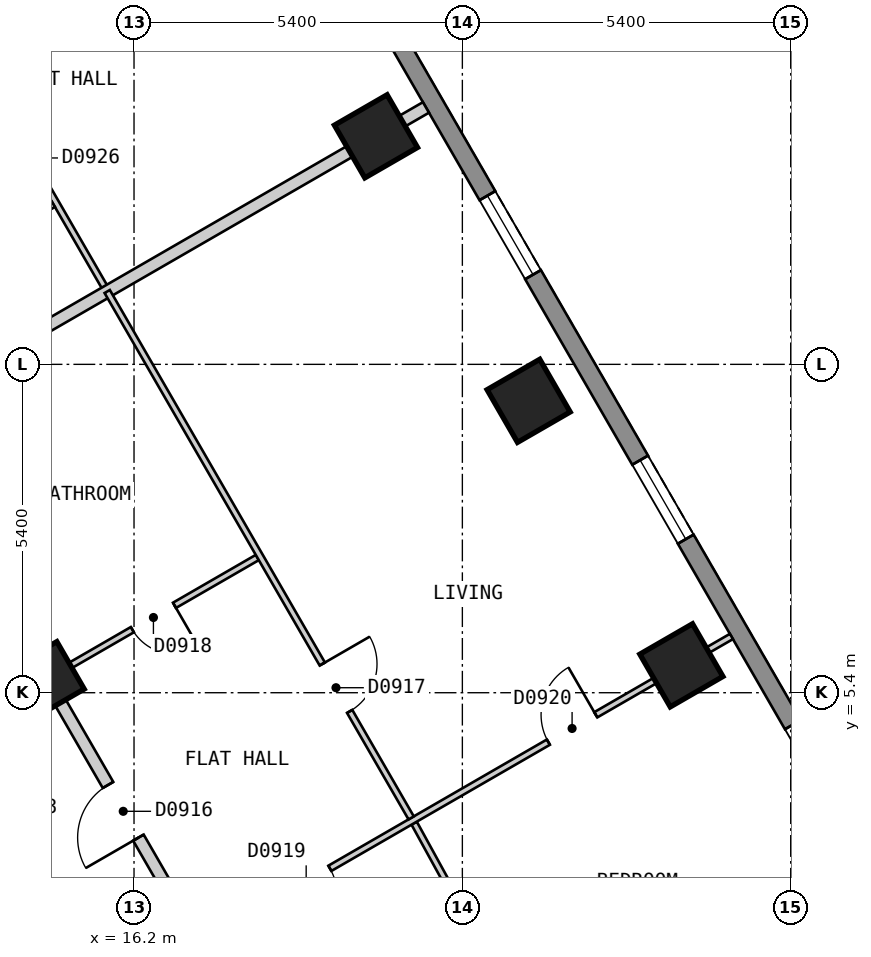
"""IFC4 building model, lengths in metres.
Left out: names, types, materials, properties, quantities, classifications, styles, units other than length and angle.
Written with IfcOpenShell. Run it as: python <this file> out.ifc"""

import sys

from ifc_helpers import new_model, si_unit, direction, frame, frame_2d, origin, origin_2d, place, context, subcontext, project, spatial, polyline, rectangle, outline, extrude, element, fill, save


model = new_model("IFC4")
c1 = context("Model", 3, precision=1e-05, world=origin(), true_north=direction((0.0, 1.0)))
c2 = subcontext(c1, "Body", "Model", "MODEL_VIEW")
j1 = project(units=[si_unit("LENGTHUNIT", "METRE"), si_unit("PLANEANGLEUNIT", "RADIAN")], contexts=[c1])
p1 = place(None, origin())
s1 = spatial("IfcSite", under=j1, at=p1, CompositionType="ELEMENT")
p2 = place(p1, origin())
s2 = spatial("IfcBuilding", under=s1, at=p2, CompositionType="ELEMENT")
p3 = place(p2, frame((0.0, 0.0, 102.0)))
s3 = spatial("IfcBuildingStorey", under=s2, at=p3, CompositionType="ELEMENT", Elevation=102.0)
for number, where, z_axis, x_axis in (
    (1, (25.202, 5.85, 0.0), (0.0, 0.0, 1.0), (-0.5, 0.866, 0.0)),
    (2, (22.69, 10.2, 0.0), (0.0, 0.0, 1.0), (-0.5, 0.866, 0.0)),
    (3, (20.179, 14.55, 0.0), (0.0, 0.0, 1.0), (-0.5, 0.866, 0.0)),
):
    element("IfcColumn", number, at=place(p3, frame(where, z_axis=z_axis, x_axis=x_axis)), inside=s3, PredefinedType="COLUMN", context=c2, shape_type="SweptSolid", body=[
        extrude(rectangle(XDim=1.0, YDim=1.0, at=origin_2d()), origin(), (0.0, 0.0, 1.0), 3.0),
    ])
p4 = place(p3, frame((14.766, 5.625, 0.0), z_axis=(0.0, 0.0, 1.0), x_axis=(-0.5, 0.866025403784, 0.0)))
e4 = element("IfcColumn", 4, at=p4, inside=s3, PredefinedType="COLUMN", context=c2, shape_type="SweptSolid", body=[
    extrude(rectangle(XDim=0.9, YDim=0.9, at=origin_2d()), origin(), (0.0, 0.0, 1.0), 3.0),
])
p5 = place(p3, frame((29.027, 1.425, 0.0), z_axis=(0.0, 0.0, 1.0), x_axis=(-0.500027479704, 0.866009537788, 0.0)))
e5 = element("IfcWall", 5, at=p5, inside=s3, PredefinedType="SOLIDWALL", context=c2, shape_type="SweptSolid", body=[
    extrude(outline(polyline([(0.0, -0.15), (26.559, -0.15), (26.478, 0.15), (0.08, 0.15), (0.0, -0.15)])), origin(), (0.0, 0.0, 1.0), 2.7),
])
p6 = place(p5, frame((2.483, 0.0, 0.15)))
e6 = element("IfcOpeningElement", 6, at=p6, cuts=e5, PredefinedType="OPENING", context=c2, shape_type="SweptSolid", body=[
    extrude(rectangle(XDim=1.5, YDim=2.1, at=frame_2d((0.75, 1.05))), frame((0.0, 0.16, 0.0), z_axis=(0.0, -1.0, 0.0), x_axis=(1.0, 0.0, 0.0)), (0.0, 0.0, 1.0), 0.32),
])
p7 = place(p5, frame((7.506, 0.0, 0.15)))
e7 = element("IfcOpeningElement", 7, at=p7, cuts=e5, PredefinedType="OPENING", context=c2, shape_type="SweptSolid", body=[
    extrude(rectangle(XDim=1.5, YDim=2.1, at=frame_2d((0.75, 1.05))), frame((0.0, 0.16, 0.0), z_axis=(0.0, -1.0, 0.0), x_axis=(1.0, 0.0, 0.0)), (0.0, 0.0, 1.0), 0.32),
])
p8 = place(p5, frame((12.529, 0.0, 0.15)))
e8 = element("IfcOpeningElement", 8, at=p8, cuts=e5, PredefinedType="OPENING", context=c2, shape_type="SweptSolid", body=[
    extrude(rectangle(XDim=1.5, YDim=2.1, at=frame_2d((0.75, 1.05))), frame((0.0, 0.16, 0.0), z_axis=(0.0, -1.0, 0.0), x_axis=(1.0, 0.0, 0.0)), (0.0, 0.0, 1.0), 0.32),
])
p9 = place(p5, frame((17.552, 0.0, 0.15)))
e9 = element("IfcOpeningElement", 9, at=p9, cuts=e5, PredefinedType="OPENING", context=c2, shape_type="SweptSolid", body=[
    extrude(rectangle(XDim=1.5, YDim=2.1, at=frame_2d((0.75, 1.05))), frame((0.0, 0.16, 0.0), z_axis=(0.0, -1.0, 0.0), x_axis=(1.0, 0.0, 0.0)), (0.0, 0.0, 1.0), 0.32),
])
p10 = place(p5, frame((22.575, 0.0, 0.15)))
e10 = element("IfcOpeningElement", 10, at=p10, cuts=e5, PredefinedType="OPENING", context=c2, shape_type="SweptSolid", body=[
    extrude(rectangle(XDim=1.5, YDim=2.1, at=frame_2d((0.75, 1.05))), frame((0.0, 0.16, 0.0), z_axis=(0.0, -1.0, 0.0), x_axis=(1.0, 0.0, 0.0)), (0.0, 0.0, 1.0), 0.32),
])
p11 = place(p3, frame((10.913, 7.899, 0.0), z_axis=(0.0, 0.0, 1.0), x_axis=(0.500028940566, -0.866008694296, 0.0)))
e11 = element("IfcWall", 11, at=p11, inside=s3, PredefinedType="PARTITIONING", context=c2, shape_type="SweptSolid", body=[
    extrude(rectangle(XDim=10.159, YDim=0.2, at=frame_2d((5.08, 0.0))), origin(), (0.0, 0.0, 1.0), 2.7),
])
p12 = place(p11, frame((4.63, 0.0, 0.0)))
e12 = element("IfcOpeningElement", 12, at=p12, cuts=e11, PredefinedType="OPENING", context=c2, shape_type="SweptSolid", body=[
    extrude(rectangle(XDim=0.9, YDim=2.1, at=frame_2d((0.45, 1.05))), frame((0.0, 0.11, 0.0), z_axis=(0.0, -1.0, 0.0), x_axis=(1.0, 0.0, 0.0)), (0.0, 0.0, 1.0), 0.22),
])
p13 = place(p3, frame((8.488, 16.5, 0.0), z_axis=(0.0, 0.0, 1.0), x_axis=(0.499986836607, -0.86603300354, 0.0)))
e13 = element("IfcWall", 13, at=p13, inside=s3, PredefinedType="PARTITIONING", context=c2, shape_type="SweptSolid", body=[
    extrude(rectangle(XDim=20.09, YDim=0.2, at=frame_2d((10.045, 0.0))), origin(), (0.0, 0.0, 1.0), 2.7),
])
p14 = place(p13, frame((14.569, 0.0, 0.0)))
e14 = element("IfcOpeningElement", 14, at=p14, cuts=e13, PredefinedType="OPENING", context=c2, shape_type="SweptSolid", body=[
    extrude(rectangle(XDim=1.0, YDim=2.1, at=frame_2d((0.5, 1.05))), frame((0.0, 0.11, 0.0), z_axis=(0.0, -1.0, 0.0), x_axis=(1.0, 0.0, 0.0)), (0.0, 0.0, 1.0), 0.22),
])
p15 = place(p13, frame((4.547, 0.0, 0.0)))
e15 = element("IfcOpeningElement", 15, at=p15, cuts=e13, PredefinedType="OPENING", context=c2, shape_type="SweptSolid", body=[
    extrude(rectangle(XDim=1.0, YDim=2.1, at=frame_2d((0.5, 1.05))), frame((0.0, 0.11, 0.0), z_axis=(0.0, -1.0, 0.0), x_axis=(1.0, 0.0, 0.0)), (0.0, 0.0, 1.0), 0.22),
])
p16 = place(p3, frame((13.263, 16.322, 0.0), z_axis=(0.0, 0.0, 1.0), x_axis=(0.499946798379, -0.866056117576, 0.0)))
e16 = element("IfcWall", 16, at=p16, inside=s3, PredefinedType="PARTITIONING", context=c2, shape_type="SweptSolid", body=[
    extrude(rectangle(XDim=4.993, YDim=0.1, at=frame_2d((2.496, 0.0))), origin(), (0.0, 0.0, 1.0), 2.7),
])
p17 = place(p16, frame((2.007, 0.0, 0.0)))
e17 = element("IfcOpeningElement", 17, at=p17, cuts=e16, PredefinedType="OPENING", context=c2, shape_type="SweptSolid", body=[
    extrude(rectangle(XDim=0.9, YDim=2.1, at=frame_2d((0.45, 1.05))), frame((0.0, 0.06, 0.0), z_axis=(0.0, -1.0, 0.0), x_axis=(1.0, 0.0, 0.0)), (0.0, 0.0, 1.0), 0.12),
])
p18 = place(p3, frame((20.807, 3.255, 0.0), z_axis=(0.0, 0.0, 1.0), x_axis=(0.481604009855, -0.876388942018, 0.0)))
e18 = element("IfcWall", 18, at=p18, inside=s3, PredefinedType="PARTITIONING", context=c2, shape_type="SweptSolid", body=[
    extrude(rectangle(XDim=4.795, YDim=0.1, at=frame_2d((2.397, 0.0))), origin(), (0.0, 0.0, 1.0), 2.7),
])
p19 = place(p3, frame((17.365, 1.325, 0.0), z_axis=(0.0, 0.0, 1.0), x_axis=(0.866016855193, 0.500014806302, 0.0)))
e19 = element("IfcWall", 19, at=p19, inside=s3, PredefinedType="PARTITIONING", context=c2, shape_type="SweptSolid", body=[
    extrude(rectangle(XDim=10.0, YDim=0.1, at=frame_2d((5.0, 0.0))), origin(), (0.0, 0.0, 1.0), 2.7),
])
p20 = place(p19, frame((1.474, 0.0, 0.0)))
e20 = element("IfcOpeningElement", 20, at=p20, cuts=e19, PredefinedType="OPENING", context=c2, shape_type="SweptSolid", body=[
    extrude(rectangle(XDim=0.9, YDim=2.1, at=frame_2d((0.45, 1.05))), frame((0.0, 0.06, 0.0), z_axis=(0.0, -1.0, 0.0), x_axis=(1.0, 0.0, 0.0)), (0.0, 0.0, 1.0), 0.12),
])
p21 = place(p19, frame((6.524, 0.0, 0.0)))
e21 = element("IfcOpeningElement", 21, at=p21, cuts=e19, PredefinedType="OPENING", context=c2, shape_type="SweptSolid", body=[
    extrude(rectangle(XDim=0.9, YDim=2.1, at=frame_2d((0.45, 1.05))), frame((0.0, 0.06, 0.0), z_axis=(0.0, -1.0, 0.0), x_axis=(1.0, 0.0, 0.0)), (0.0, 0.0, 1.0), 0.12),
])
p22 = place(p3, frame((14.853, 5.675, 0.0), z_axis=(0.0, 0.0, 1.0), x_axis=(0.865979019114, 0.500080332001, 0.0)))
e22 = element("IfcWall", 22, at=p22, inside=s3, PredefinedType="PARTITIONING", context=c2, shape_type="SweptSolid", body=[
    extrude(rectangle(XDim=3.897, YDim=0.1, at=frame_2d((1.949, 0.0))), origin(), (0.0, 0.0, 1.0), 2.7),
])
p23 = place(p22, frame((1.524, 0.0, 0.0)))
e23 = element("IfcOpeningElement", 23, at=p23, cuts=e22, PredefinedType="OPENING", context=c2, shape_type="SweptSolid", body=[
    extrude(rectangle(XDim=0.8, YDim=2.1, at=frame_2d((0.4, 1.05))), frame((0.0, 0.06, 0.0), z_axis=(0.0, -1.0, 0.0), x_axis=(1.0, 0.0, 0.0)), (0.0, 0.0, 1.0), 0.12),
])
p24 = place(p3, frame((11.522, 11.444, 0.0), z_axis=(0.0, 0.0, 1.0), x_axis=(0.860134781641, 0.510066816615, 0.0)))
e24 = element("IfcWall", 24, at=p24, inside=s3, PredefinedType="PARTITIONING", context=c2, shape_type="SweptSolid", body=[
    extrude(rectangle(XDim=3.897, YDim=0.1, at=frame_2d((1.949, 0.0))), origin(), (0.0, 0.0, 1.0), 2.7),
])
p25 = place(p24, frame((1.473, 0.0, 0.0)))
e25 = element("IfcOpeningElement", 25, at=p25, cuts=e24, PredefinedType="OPENING", context=c2, shape_type="SweptSolid", body=[
    extrude(rectangle(XDim=0.9, YDim=2.1, at=frame_2d((0.45, 1.05))), frame((0.0, 0.06, 0.0), z_axis=(0.0, -1.0, 0.0), x_axis=(1.0, 0.0, 0.0)), (0.0, 0.0, 1.0), 0.12),
])
p26 = place(p3, frame((12.342, 10.025, 0.0), z_axis=(0.0, 0.0, 1.0), x_axis=(0.865992435864, 0.500057097767, 0.0)))
e26 = element("IfcWall", 26, at=p26, inside=s3, PredefinedType="PARTITIONING", context=c2, shape_type="SweptSolid", body=[
    extrude(rectangle(XDim=9.999, YDim=0.2, at=frame_2d((5.0, 0.0))), origin(), (0.0, 0.0, 1.0), 2.7),
])
p27 = place(p3, frame((15.759, 11.998, 0.0), z_axis=(0.0, 0.0, 1.0), x_axis=(0.500068444113, -0.865985883951, 0.0)))
e27 = element("IfcWall", 27, at=p27, inside=s3, PredefinedType="PARTITIONING", context=c2, shape_type="SweptSolid", body=[
    extrude(rectangle(XDim=9.997, YDim=0.1, at=frame_2d((4.998, 0.0))), origin(), (0.0, 0.0, 1.0), 2.7),
])
p28 = place(p27, frame((7.074, 0.0, 0.0)))
e28 = element("IfcOpeningElement", 28, at=p28, cuts=e27, PredefinedType="OPENING", context=c2, shape_type="SweptSolid", body=[
    extrude(rectangle(XDim=0.9, YDim=2.1, at=frame_2d((0.45, 1.05))), frame((0.0, 0.06, 0.0), z_axis=(0.0, -1.0, 0.0), x_axis=(1.0, 0.0, 0.0)), (0.0, 0.0, 1.0), 0.12),
])
p29 = place(p7, origin())
e29 = element("IfcWindow", 29, at=p29, inside=s3, PartitioningType="SINGLE_PANEL", PredefinedType="WINDOW", context=c2, shape_type="SweptSolid", body=[
    extrude(rectangle(XDim=1.5, YDim=2.1, at=frame_2d((0.75, 1.05))), frame((0.0, 0.03, 0.0), z_axis=(0.0, -1.0, 0.0), x_axis=(1.0, 0.0, 0.0)), (0.0, 0.0, 1.0), 0.06),
])
fill(e7, e29)
p30 = place(p8, origin())
e30 = element("IfcWindow", 30, at=p30, inside=s3, PartitioningType="SINGLE_PANEL", PredefinedType="WINDOW", context=c2, shape_type="SweptSolid", body=[
    extrude(rectangle(XDim=1.5, YDim=2.1, at=frame_2d((0.75, 1.05))), frame((0.0, 0.03, 0.0), z_axis=(0.0, -1.0, 0.0), x_axis=(1.0, 0.0, 0.0)), (0.0, 0.0, 1.0), 0.06),
])
fill(e8, e30)
p31 = place(p14, origin())
e31 = element("IfcDoor", 31, at=p31, inside=s3, OperationType="SINGLE_SWING_RIGHT", PredefinedType="DOOR", context=c2, shape_type="SweptSolid", body=[
    extrude(rectangle(XDim=1.0, YDim=2.1, at=frame_2d((0.5, 1.05))), frame((0.0, 0.025, 0.0), z_axis=(0.0, -1.0, 0.0), x_axis=(1.0, 0.0, 0.0)), (0.0, 0.0, 1.0), 0.05),
])
fill(e14, e31)
p32 = place(p28, origin())
e32 = element("IfcDoor", 32, at=p32, inside=s3, OperationType="SINGLE_SWING_LEFT", PredefinedType="DOOR", context=c2, shape_type="SweptSolid", body=[
    extrude(rectangle(XDim=0.9, YDim=2.1, at=frame_2d((0.45, 1.05))), frame((0.0, 0.025, 0.0), z_axis=(0.0, -1.0, 0.0), x_axis=(1.0, 0.0, 0.0)), (0.0, 0.0, 1.0), 0.05),
])
fill(e28, e32)
p33 = place(p23, origin())
e33 = element("IfcDoor", 33, at=p33, inside=s3, OperationType="SINGLE_SWING_RIGHT", PredefinedType="DOOR", context=c2, shape_type="SweptSolid", body=[
    extrude(rectangle(XDim=0.8, YDim=2.1, at=frame_2d((0.4, 1.05))), frame((0.0, 0.025, 0.0), z_axis=(0.0, -1.0, 0.0), x_axis=(1.0, 0.0, 0.0)), (0.0, 0.0, 1.0), 0.05),
])
fill(e23, e33)
p34 = place(p20, origin())
e34 = element("IfcDoor", 34, at=p34, inside=s3, OperationType="SINGLE_SWING_LEFT", PredefinedType="DOOR", context=c2, shape_type="SweptSolid", body=[
    extrude(rectangle(XDim=0.9, YDim=2.1, at=frame_2d((0.45, 1.05))), frame((0.0, 0.025, 0.0), z_axis=(0.0, -1.0, 0.0), x_axis=(1.0, 0.0, 0.0)), (0.0, 0.0, 1.0), 0.05),
])
fill(e20, e34)
p35 = place(p21, origin())
e35 = element("IfcDoor", 35, at=p35, inside=s3, OperationType="SINGLE_SWING_RIGHT", PredefinedType="DOOR", context=c2, shape_type="SweptSolid", body=[
    extrude(rectangle(XDim=0.9, YDim=2.1, at=frame_2d((0.45, 1.05))), frame((0.0, 0.025, 0.0), z_axis=(0.0, -1.0, 0.0), x_axis=(1.0, 0.0, 0.0)), (0.0, 0.0, 1.0), 0.05),
])
fill(e21, e35)
save(model, sys.argv[1])
